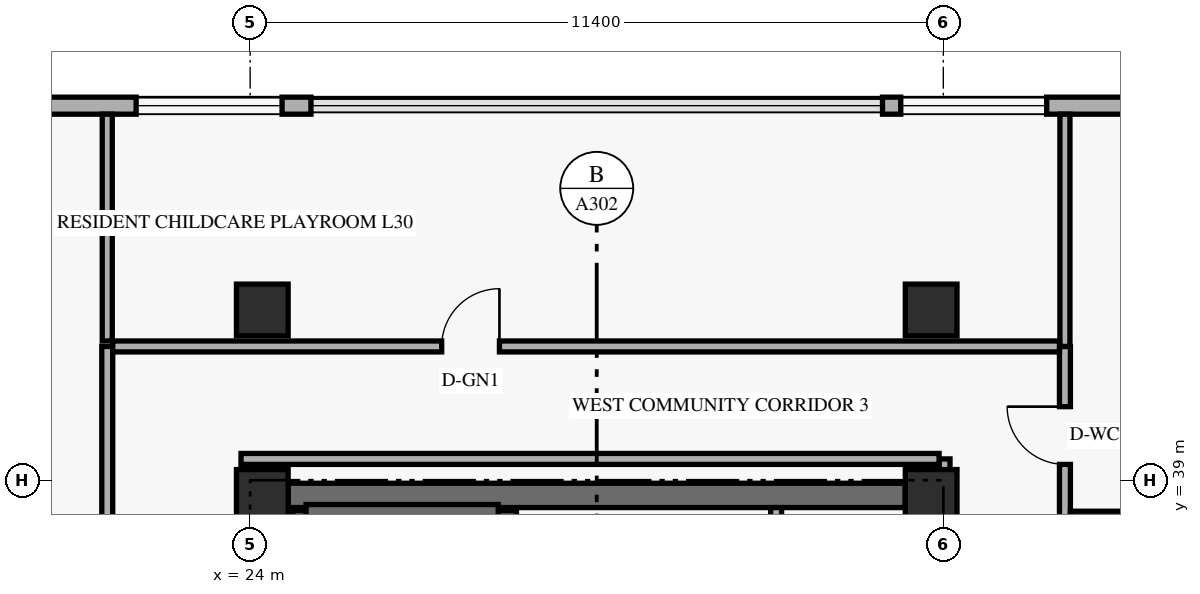
"""IFC4 building model, lengths in metres.
Left out: names, types, materials, properties, quantities, classifications, styles, units other than length and angle.
Written with IfcOpenShell. Run it as: python <this file> out.ifc"""

import sys

from ifc_helpers import new_model, si_unit, direction, frame, frame_2d, origin, origin_2d, place, context, subcontext, project, spatial, rectangle, extrude, element, fill, save


model = new_model("IFC4")
c1 = context("Model", 3, precision=1e-05, world=origin(), true_north=direction((0.0, 1.0)))
c2 = subcontext(c1, "Body", "Model", "MODEL_VIEW")
j1 = project(units=[si_unit("LENGTHUNIT", "METRE"), si_unit("PLANEANGLEUNIT", "RADIAN")], contexts=[c1])
p1 = place(None, origin())
s1 = spatial("IfcSite", under=j1, at=p1, CompositionType="ELEMENT")
p2 = place(p1, origin())
s2 = spatial("IfcBuilding", under=s1, at=p2, CompositionType="ELEMENT")
p3 = place(p2, frame((0.0, 0.0, 117.0)))
s3 = spatial("IfcBuildingStorey", under=s2, at=p3, CompositionType="ELEMENT", Elevation=117.0)
p4 = place(p3, frame((24.625, 38.75, 0.0), z_axis=(0.0, 0.0, 1.0), x_axis=(1.0, 0.0, 0.0)))
e1 = element("IfcWall", 1, at=p4, inside=s3, PredefinedType="SHEAR", context=c2, shape_type="SweptSolid", body=[
    extrude(rectangle(XDim=10.15, YDim=0.4, at=frame_2d((5.075, 0.0))), origin(), (0.0, 0.0, 1.0), 3.96),
])
p5 = place(p3, frame((24.81, 30.74, 0.0), z_axis=(0.0, 0.0, 1.0), x_axis=(0.0, 1.0, 0.0)))
e2 = element("IfcWall", 2, at=p5, inside=s3, PredefinedType="SHEAR", context=c2, shape_type="SweptSolid", body=[
    extrude(rectangle(XDim=7.76, YDim=0.22, at=frame_2d((3.88, 0.0))), origin(), (0.0, 0.0, 1.0), 3.96),
])
p6 = place(p3, frame((28.23, 30.74, 0.0), z_axis=(0.0, 0.0, 1.0), x_axis=(0.0, 1.0, 0.0)))
e3 = element("IfcWall", 3, at=p6, inside=s3, PredefinedType="SHEAR", context=c2, shape_type="SweptSolid", body=[
    extrude(rectangle(XDim=7.76, YDim=0.3, at=frame_2d((3.88, 0.0))), origin(), (0.0, 0.0, 1.0), 3.96),
])
p7 = place(p3, frame((24.92, 38.49, 0.0), z_axis=(0.0, 0.0, 1.0), x_axis=(1.0, 0.0, 0.0)))
e4 = element("IfcWall", 4, at=p7, inside=s3, PredefinedType="SHEAR", context=c2, shape_type="SweptSolid", body=[
    extrude(rectangle(XDim=3.16, YDim=0.22, at=frame_2d((1.58, 0.0))), origin(), (0.0, 0.0, 1.0), 3.96),
])
for number, where, z_axis, x_axis in (
    (5, (24.2, 38.75, 0.0), (0.0, 0.0, 1.0), (1.0, 0.0, 0.0)),
    (6, (24.2, 41.8, 0.0), (0.0, 0.0, 1.0), (1.0, 0.0, 0.0)),
    (7, (35.2, 38.75, 0.0), (0.0, 0.0, 1.0), (1.0, 0.0, 0.0)),
    (8, (35.2, 41.8, 0.0), (0.0, 0.0, 1.0), (1.0, 0.0, 0.0)),
):
    element("IfcColumn", number, at=place(p3, frame(where, z_axis=z_axis, x_axis=x_axis)), inside=s3, PredefinedType="COLUMN", context=c2, shape_type="SweptSolid", body=[
        extrude(rectangle(XDim=0.85, YDim=0.85, at=origin_2d()), origin(), (0.0, 0.0, 1.0), 4.2),
    ])
p8 = place(p3, frame((49.98, 45.16, 0.0), z_axis=(0.0, 0.0, 1.0), x_axis=(-1.0, 0.0, 0.0)))
e9 = element("IfcWall", 9, at=p8, inside=s3, PredefinedType="SOLIDWALL", context=c2, shape_type="SweptSolid", body=[
    extrude(rectangle(XDim=15.58, YDim=0.28, at=frame_2d((7.79, 0.0))), origin(), (0.0, 0.0, 1.0), 3.96),
])
p9 = place(p8, frame((12.88, 0.0, 0.85)))
e10 = element("IfcOpeningElement", 10, at=p9, cuts=e9, PredefinedType="OPENING", context=c2, shape_type="SweptSolid", body=[
    extrude(rectangle(XDim=2.4, YDim=1.9, at=frame_2d((1.2, 0.95))), frame((0.0, 0.15, 0.0), z_axis=(0.0, -1.0, 0.0), x_axis=(1.0, 0.0, 0.0)), (0.0, 0.0, 1.0), 0.3),
])
p10 = place(p8, frame((8.33, 0.0, 0.85)))
e11 = element("IfcOpeningElement", 11, at=p10, cuts=e9, PredefinedType="OPENING", context=c2, shape_type="SweptSolid", body=[
    extrude(rectangle(XDim=2.4, YDim=1.9, at=frame_2d((1.2, 0.95))), frame((0.0, 0.15, 0.0), z_axis=(0.0, -1.0, 0.0), x_axis=(1.0, 0.0, 0.0)), (0.0, 0.0, 1.0), 0.3),
])
p11 = place(p8, frame((2.04, 0.0, 0.85)))
e12 = element("IfcOpeningElement", 12, at=p11, cuts=e9, PredefinedType="OPENING", context=c2, shape_type="SweptSolid", body=[
    extrude(rectangle(XDim=2.4, YDim=1.9, at=frame_2d((1.2, 0.95))), frame((0.0, 0.15, 0.0), z_axis=(0.0, -1.0, 0.0), x_axis=(1.0, 0.0, 0.0)), (0.0, 0.0, 1.0), 0.3),
])
p12 = place(p3, frame((25.0, 45.16, 0.0), z_axis=(0.0, 0.0, 1.0), x_axis=(-1.0, 0.0, 0.0)))
e13 = element("IfcWall", 13, at=p12, inside=s3, PredefinedType="SOLIDWALL", context=c2, shape_type="SweptSolid", body=[
    extrude(rectangle(XDim=11.58, YDim=0.28, at=frame_2d((5.79, 0.0))), origin(), (0.0, 0.0, 1.0), 3.96),
])
p13 = place(p12, frame((6.265, 0.0, 0.85)))
e14 = element("IfcOpeningElement", 14, at=p13, cuts=e13, PredefinedType="OPENING", context=c2, shape_type="SweptSolid", body=[
    extrude(rectangle(XDim=2.4, YDim=1.9, at=frame_2d((1.2, 0.95))), frame((0.0, 0.15, 0.0), z_axis=(0.0, -1.0, 0.0), x_axis=(1.0, 0.0, 0.0)), (0.0, 0.0, 1.0), 0.3),
])
p14 = place(p12, frame((0.475, 0.0, 0.85)))
e15 = element("IfcOpeningElement", 15, at=p14, cuts=e13, PredefinedType="OPENING", context=c2, shape_type="SweptSolid", body=[
    extrude(rectangle(XDim=2.4, YDim=1.9, at=frame_2d((1.2, 0.95))), frame((0.0, 0.15, 0.0), z_axis=(0.0, -1.0, 0.0), x_axis=(1.0, 0.0, 0.0)), (0.0, 0.0, 1.0), 0.3),
])
p15 = place(p3, frame((32.65, 31.35, 0.0), z_axis=(0.0, 0.0, 1.0), x_axis=(0.0, 1.0, 0.0)))
e16 = element("IfcWall", 16, at=p15, inside=s3, PredefinedType="STANDARD", context=c2, shape_type="SweptSolid", body=[
    extrude(rectangle(XDim=7.2, YDim=0.18, at=frame_2d((3.6, 0.0))), origin(), (0.0, 0.0, 1.0), 3.96),
])
p16 = place(p15, frame((0.52, 0.0, 0.0)))
e17 = element("IfcOpeningElement", 17, at=p16, cuts=e16, PredefinedType="OPENING", context=c2, shape_type="SweptSolid", body=[
    extrude(rectangle(XDim=1.05, YDim=2.2, at=frame_2d((0.525, 1.1))), frame((0.0, 0.1, 0.0), z_axis=(0.0, -1.0, 0.0), x_axis=(1.0, 0.0, 0.0)), (0.0, 0.0, 1.0), 0.2),
])
p17 = place(p15, frame((2.67, 0.0, 0.0)))
e18 = element("IfcOpeningElement", 18, at=p17, cuts=e16, PredefinedType="OPENING", context=c2, shape_type="SweptSolid", body=[
    extrude(rectangle(XDim=1.05, YDim=2.2, at=frame_2d((0.525, 1.1))), frame((0.0, 0.1, 0.0), z_axis=(0.0, -1.0, 0.0), x_axis=(1.0, 0.0, 0.0)), (0.0, 0.0, 1.0), 0.2),
])
p18 = place(p15, frame((4.82, 0.0, 0.0)))
e19 = element("IfcOpeningElement", 19, at=p18, cuts=e16, PredefinedType="OPENING", context=c2, shape_type="SweptSolid", body=[
    extrude(rectangle(XDim=1.05, YDim=2.2, at=frame_2d((0.525, 1.1))), frame((0.0, 0.1, 0.0), z_axis=(0.0, -1.0, 0.0), x_axis=(1.0, 0.0, 0.0)), (0.0, 0.0, 1.0), 0.2),
])
p19 = place(p3, frame((37.4, 6.8, 0.0), z_axis=(0.0, 0.0, 1.0), x_axis=(0.0, 1.0, 0.0)))
e20 = element("IfcWall", 20, at=p19, inside=s3, PredefinedType="STANDARD", context=c2, shape_type="SweptSolid", body=[
    extrude(rectangle(XDim=34.4, YDim=0.18, at=frame_2d((17.2, 0.0))), origin(), (0.0, 0.0, 1.0), 3.331),
])
p20 = place(p19, frame((25.57, 0.0, 0.0)))
e21 = element("IfcOpeningElement", 21, at=p20, cuts=e20, PredefinedType="OPENING", context=c2, shape_type="SweptSolid", body=[
    extrude(rectangle(XDim=0.92, YDim=2.14, at=frame_2d((0.46, 1.07))), frame((0.0, 0.1, 0.0), z_axis=(0.0, -1.0, 0.0), x_axis=(1.0, 0.0, 0.0)), (0.0, 0.0, 1.0), 0.2),
])
p21 = place(p19, frame((32.46, 0.0, 0.0)))
e22 = element("IfcOpeningElement", 22, at=p21, cuts=e20, PredefinedType="OPENING", context=c2, shape_type="SweptSolid", body=[
    extrude(rectangle(XDim=0.95, YDim=2.14, at=frame_2d((0.475, 1.07))), frame((0.0, 0.1, 0.0), z_axis=(0.0, -1.0, 0.0), x_axis=(1.0, 0.0, 0.0)), (0.0, 0.0, 1.0), 0.2),
])
p22 = place(p19, frame((2.8, 0.0, 0.0)))
e23 = element("IfcOpeningElement", 23, at=p22, cuts=e20, PredefinedType="OPENING", context=c2, shape_type="SweptSolid", body=[
    extrude(rectangle(XDim=1.15, YDim=2.15, at=frame_2d((0.575, 1.075))), frame((0.0, 0.1, 0.0), z_axis=(0.0, -1.0, 0.0), x_axis=(1.0, 0.0, 0.0)), (0.0, 0.0, 1.0), 0.2),
])
p23 = place(p19, frame((21.6, 0.0, 0.0)))
e24 = element("IfcOpeningElement", 24, at=p23, cuts=e20, PredefinedType="OPENING", context=c2, shape_type="SweptSolid", body=[
    extrude(rectangle(XDim=1.15, YDim=2.15, at=frame_2d((0.575, 1.075))), frame((0.0, 0.1, 0.0), z_axis=(0.0, -1.0, 0.0), x_axis=(1.0, 0.0, 0.0)), (0.0, 0.0, 1.0), 0.2),
])
p24 = place(p3, frame((37.4, 41.2, 0.0), z_axis=(0.0, 0.0, 1.0), x_axis=(0.0, 1.0, 0.0)))
e25 = element("IfcWall", 25, at=p24, inside=s3, PredefinedType="PARTITIONING", context=c2, shape_type="SweptSolid", body=[
    extrude(rectangle(XDim=3.82, YDim=0.165, at=frame_2d((1.91, 0.0))), origin(), (0.0, 0.0, 1.0), 3.409),
])
p25 = place(p3, frame((35.42, 38.75, 0.0), z_axis=(0.0, 0.0, 1.0), x_axis=(0.0, 1.0, 0.0)))
e26 = element("IfcWall", 26, at=p25, inside=s3, PredefinedType="STANDARD", context=c2, shape_type="SweptSolid", body=[
    extrude(rectangle(XDim=0.6, YDim=0.18, at=frame_2d((0.3, 0.0))), origin(), (0.0, 0.0, 1.0), 3.331),
])
p26 = place(p3, frame((37.49, 38.41, 0.0), z_axis=(0.0, 0.0, 1.0), x_axis=(1.0, 0.0, 0.0)))
e27 = element("IfcWall", 27, at=p26, inside=s3, PredefinedType="PLUMBINGWALL", context=c2, shape_type="SweptSolid", body=[
    extrude(rectangle(XDim=5.93, YDim=0.16, at=frame_2d((2.965, 0.0))), origin(), (0.0, 0.0, 1.0), 3.96),
])
p27 = place(p3, frame((21.65, 6.8, 0.0), z_axis=(0.0, 0.0, 1.0), x_axis=(0.0, 1.0, 0.0)))
e28 = element("IfcWall", 28, at=p27, inside=s3, PredefinedType="STANDARD", context=c2, shape_type="SweptSolid", body=[
    extrude(rectangle(XDim=34.4, YDim=0.18, at=frame_2d((17.2, 0.0))), origin(), (0.0, 0.0, 1.0), 3.331),
])
p28 = place(p27, frame((7.5, 0.0, 0.0)))
e29 = element("IfcOpeningElement", 29, at=p28, cuts=e28, PredefinedType="OPENING", context=c2, shape_type="SweptSolid", body=[
    extrude(rectangle(XDim=0.95, YDim=2.15, at=frame_2d((0.475, 1.075))), frame((0.0, 0.1, 0.0), z_axis=(0.0, -1.0, 0.0), x_axis=(1.0, 0.0, 0.0)), (0.0, 0.0, 1.0), 0.2),
])
p29 = place(p27, frame((22.5, 0.0, 0.0)))
e30 = element("IfcOpeningElement", 30, at=p29, cuts=e28, PredefinedType="OPENING", context=c2, shape_type="SweptSolid", body=[
    extrude(rectangle(XDim=0.95, YDim=2.15, at=frame_2d((0.475, 1.075))), frame((0.0, 0.1, 0.0), z_axis=(0.0, -1.0, 0.0), x_axis=(1.0, 0.0, 0.0)), (0.0, 0.0, 1.0), 0.2),
])
p30 = place(p3, frame((21.74, 41.2, 0.0), z_axis=(0.0, 0.0, 1.0), x_axis=(1.0, 0.0, 0.0)))
e31 = element("IfcWall", 31, at=p30, inside=s3, PredefinedType="STANDARD", context=c2, shape_type="SweptSolid", body=[
    extrude(rectangle(XDim=15.57, YDim=0.18, at=frame_2d((7.785, 0.0))), origin(), (0.0, 0.0, 1.0), 3.331),
])
p31 = place(p30, frame((5.41, 0.0, 0.0)))
e32 = element("IfcOpeningElement", 32, at=p31, cuts=e31, PredefinedType="OPENING", context=c2, shape_type="SweptSolid", body=[
    extrude(rectangle(XDim=0.95, YDim=2.15, at=frame_2d((0.475, 1.075))), frame((0.0, 0.1, 0.0), z_axis=(0.0, -1.0, 0.0), x_axis=(1.0, 0.0, 0.0)), (0.0, 0.0, 1.0), 0.2),
])
p32 = place(p3, frame((23.85, 39.35, 0.0), z_axis=(0.0, 0.0, 1.0), x_axis=(1.0, 0.0, 0.0)))
e33 = element("IfcWall", 33, at=p32, inside=s3, PredefinedType="STANDARD", context=c2, shape_type="SweptSolid", body=[
    extrude(rectangle(XDim=11.48, YDim=0.18, at=frame_2d((5.74, 0.0))), origin(), (0.0, 0.0, 1.0), 3.331),
])
p33 = place(p3, frame((21.65, 41.29, 0.0), z_axis=(0.0, 0.0, 1.0), x_axis=(0.0, 1.0, 0.0)))
e34 = element("IfcWall", 34, at=p33, inside=s3, PredefinedType="PARTITIONING", context=c2, shape_type="SweptSolid", body=[
    extrude(rectangle(XDim=3.73, YDim=0.165, at=frame_2d((1.865, 0.0))), origin(), (0.0, 0.0, 1.0), 3.409),
])
p34 = place(p9, origin())
e35 = element("IfcWindow", 35, at=p34, inside=s3, PartitioningType="SINGLE_PANEL", PredefinedType="WINDOW", context=c2, shape_type="SweptSolid", body=[
    extrude(rectangle(XDim=2.4, YDim=1.9, at=frame_2d((1.2, 0.95))), frame((0.0, 0.03, 0.0), z_axis=(0.0, -1.0, 0.0), x_axis=(1.0, 0.0, 0.0)), (0.0, 0.0, 1.0), 0.06),
])
fill(e10, e35)
p35 = place(p14, origin())
e36 = element("IfcWindow", 36, at=p35, inside=s3, PartitioningType="SINGLE_PANEL", PredefinedType="WINDOW", context=c2, shape_type="SweptSolid", body=[
    extrude(rectangle(XDim=2.4, YDim=1.9, at=frame_2d((1.2, 0.95))), frame((0.0, 0.03, 0.0), z_axis=(0.0, -1.0, 0.0), x_axis=(1.0, 0.0, 0.0)), (0.0, 0.0, 1.0), 0.06),
])
fill(e15, e36)
p36 = place(p21, origin())
e37 = element("IfcDoor", 37, at=p36, inside=s3, OperationType="SINGLE_SWING_RIGHT", PredefinedType="DOOR", context=c2, shape_type="SweptSolid", body=[
    extrude(rectangle(XDim=0.95, YDim=2.14, at=frame_2d((0.475, 1.07))), frame((0.0, 0.025, 0.0), z_axis=(0.0, -1.0, 0.0), x_axis=(1.0, 0.0, 0.0)), (0.0, 0.0, 1.0), 0.05),
])
fill(e22, e37)
p37 = place(p31, origin())
e38 = element("IfcDoor", 38, at=p37, inside=s3, OperationType="SINGLE_SWING_RIGHT", PredefinedType="DOOR", context=c2, shape_type="SweptSolid", body=[
    extrude(rectangle(XDim=0.95, YDim=2.15, at=frame_2d((0.475, 1.075))), frame((0.0, 0.025, 0.0), z_axis=(0.0, -1.0, 0.0), x_axis=(1.0, 0.0, 0.0)), (0.0, 0.0, 1.0), 0.05),
])
fill(e32, e38)
save(model, sys.argv[1])
